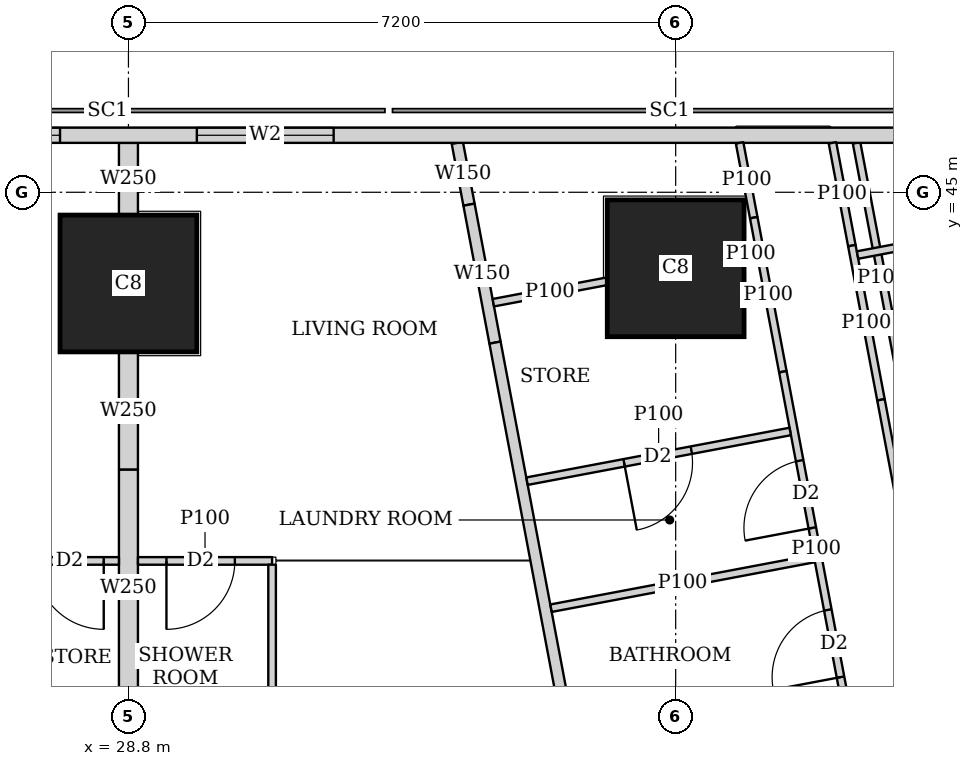
"""IFC4 building model, lengths in metres.
Left out: names, types, materials, properties, quantities, classifications, styles, units other than length and angle.
Written with IfcOpenShell. Run it as: python <this file> out.ifc"""

import sys

from ifc_helpers import new_model, si_unit, direction, frame, frame_2d, origin, origin_2d, place, context, subcontext, project, spatial, rectangle, extrude, element, fill, save


model = new_model("IFC4")
c1 = context("Model", 3, precision=1e-05, world=origin(), true_north=direction((0.0, 1.0)))
c2 = subcontext(c1, "Body", "Model", "MODEL_VIEW")
j1 = project(units=[si_unit("LENGTHUNIT", "METRE"), si_unit("PLANEANGLEUNIT", "RADIAN")], contexts=[c1])
p1 = place(None, origin())
s1 = spatial("IfcSite", under=j1, at=p1, CompositionType="ELEMENT")
p2 = place(p1, origin())
s2 = spatial("IfcBuilding", under=s1, at=p2, CompositionType="ELEMENT")
p3 = place(p2, frame((0.0, 0.0, 180.8)))
s3 = spatial("IfcBuildingStorey", under=s2, at=p3, CompositionType="ELEMENT", Elevation=180.8)
for number, where, z_axis, x_axis in (
    (1, (28.8, 43.8, 0.0), (0.0, 0.0, 1.0), (1.0, 0.0, 0.0)),
    (2, (36.0, 44.0, 0.0), (0.0, 0.0, 1.0), (1.0, 0.0, 0.0)),
):
    element("IfcColumn", number, at=place(p3, frame(where, z_axis=z_axis, x_axis=x_axis)), inside=s3, PredefinedType="COLUMN", context=c2, shape_type="SweptSolid", body=[
        extrude(rectangle(XDim=1.8, YDim=1.8, at=origin_2d()), origin(), (0.0, 0.0, 1.0), 3.75),
    ])
p4 = place(p3, frame((40.106, 45.75, 0.0), z_axis=(0.0, 0.0, 1.0), x_axis=(-1.0, 0.0, 0.0)))
e3 = element("IfcWall", 3, at=p4, inside=s3, PredefinedType="SOLIDWALL", context=c2, shape_type="SweptSolid", body=[
    extrude(rectangle(XDim=37.943, YDim=0.2, at=frame_2d((18.971, 0.0))), origin(), (0.0, 0.0, 1.0), 3.5),
])
p5 = place(p4, frame((8.606, 0.0, 0.9)))
e4 = element("IfcOpeningElement", 4, at=p5, cuts=e3, PredefinedType="OPENING", context=c2, shape_type="SweptSolid", body=[
    extrude(rectangle(XDim=1.8, YDim=1.5, at=frame_2d((0.9, 0.75))), frame((0.0, 0.11, 0.0), z_axis=(0.0, -1.0, 0.0), x_axis=(1.0, 0.0, 0.0)), (0.0, 0.0, 1.0), 0.22),
])
p6 = place(p4, frame((12.206, 0.0, 0.9)))
e5 = element("IfcOpeningElement", 5, at=p6, cuts=e3, PredefinedType="OPENING", context=c2, shape_type="SweptSolid", body=[
    extrude(rectangle(XDim=1.8, YDim=1.5, at=frame_2d((0.9, 0.75))), frame((0.0, 0.11, 0.0), z_axis=(0.0, -1.0, 0.0), x_axis=(1.0, 0.0, 0.0)), (0.0, 0.0, 1.0), 0.22),
])
p7 = place(p4, frame((15.806, 0.0, 0.9)))
e6 = element("IfcOpeningElement", 6, at=p7, cuts=e3, PredefinedType="OPENING", context=c2, shape_type="SweptSolid", body=[
    extrude(rectangle(XDim=1.8, YDim=1.5, at=frame_2d((0.9, 0.75))), frame((0.0, 0.11, 0.0), z_axis=(0.0, -1.0, 0.0), x_axis=(1.0, 0.0, 0.0)), (0.0, 0.0, 1.0), 0.22),
])
p8 = place(p4, frame((19.406, 0.0, 0.9)))
e7 = element("IfcOpeningElement", 7, at=p8, cuts=e3, PredefinedType="OPENING", context=c2, shape_type="SweptSolid", body=[
    extrude(rectangle(XDim=1.8, YDim=1.5, at=frame_2d((0.9, 0.75))), frame((0.0, 0.11, 0.0), z_axis=(0.0, -1.0, 0.0), x_axis=(1.0, 0.0, 0.0)), (0.0, 0.0, 1.0), 0.22),
])
p9 = place(p4, frame((23.006, 0.0, 0.9)))
e8 = element("IfcOpeningElement", 8, at=p9, cuts=e3, PredefinedType="OPENING", context=c2, shape_type="SweptSolid", body=[
    extrude(rectangle(XDim=1.8, YDim=1.5, at=frame_2d((0.9, 0.75))), frame((0.0, 0.11, 0.0), z_axis=(0.0, -1.0, 0.0), x_axis=(1.0, 0.0, 0.0)), (0.0, 0.0, 1.0), 0.22),
])
p10 = place(p4, frame((26.606, 0.0, 0.9)))
e9 = element("IfcOpeningElement", 9, at=p10, cuts=e3, PredefinedType="OPENING", context=c2, shape_type="SweptSolid", body=[
    extrude(rectangle(XDim=1.8, YDim=1.5, at=frame_2d((0.9, 0.75))), frame((0.0, 0.11, 0.0), z_axis=(0.0, -1.0, 0.0), x_axis=(1.0, 0.0, 0.0)), (0.0, 0.0, 1.0), 0.22),
])
p11 = place(p3, frame((33.127, 45.65, 0.0), z_axis=(0.0, 0.0, 1.0), x_axis=(0.186176514576, -0.982516313056, 0.0)))
e10 = element("IfcWall", 10, at=p11, inside=s3, PredefinedType="SOLIDWALL", context=c2, shape_type="SweptSolid", body=[
    extrude(rectangle(XDim=0.827, YDim=0.15, at=frame_2d((0.414, 0.0))), origin(), (0.0, 0.0, 1.0), 3.5),
])
p12 = place(p3, frame((33.281, 44.837, 0.0), z_axis=(0.0, 0.0, 1.0), x_axis=(0.185198323004, -0.982701165745, 0.0)))
e11 = element("IfcWall", 11, at=p12, inside=s3, PredefinedType="SOLIDWALL", context=c2, shape_type="SweptSolid", body=[
    extrude(rectangle(XDim=1.847, YDim=0.15, at=frame_2d((0.923, 0.0))), origin(), (0.0, 0.0, 1.0), 2.1),
])
p13 = place(p3, frame((33.623, 43.022, 0.0), z_axis=(0.0, 0.0, 1.0), x_axis=(0.185596841028, -0.98262597798, 0.0)))
e12 = element("IfcWall", 12, at=p13, inside=s3, PredefinedType="SOLIDWALL", context=c2, shape_type="SweptSolid", body=[
    extrude(rectangle(XDim=41.66, YDim=0.15, at=frame_2d((20.83, 0.0))), origin(), (0.0, 0.0, 1.0), 2.5),
])
p14 = place(p13, frame((8.034, 0.0, 0.0)))
e13 = element("IfcOpeningElement", 13, at=p14, cuts=e12, PredefinedType="OPENING", context=c2, shape_type="SweptSolid", body=[
    extrude(rectangle(XDim=1.0, YDim=2.1, at=frame_2d((0.5, 1.05))), frame((0.0, 0.085, 0.0), z_axis=(0.0, -1.0, 0.0), x_axis=(1.0, 0.0, 0.0)), (0.0, 0.0, 1.0), 0.17),
])
p15 = place(p13, frame((12.611, 0.0, 0.0)))
e14 = element("IfcOpeningElement", 14, at=p15, cuts=e12, PredefinedType="OPENING", context=c2, shape_type="SweptSolid", body=[
    extrude(rectangle(XDim=1.0, YDim=2.1, at=frame_2d((0.5, 1.05))), frame((0.0, 0.085, 0.0), z_axis=(0.0, -1.0, 0.0), x_axis=(1.0, 0.0, 0.0)), (0.0, 0.0, 1.0), 0.17),
])
p16 = place(p13, frame((20.242, 0.0, 0.0)))
e15 = element("IfcOpeningElement", 15, at=p16, cuts=e12, PredefinedType="OPENING", context=c2, shape_type="SweptSolid", body=[
    extrude(rectangle(XDim=1.0, YDim=2.1, at=frame_2d((0.5, 1.05))), frame((0.0, 0.085, 0.0), z_axis=(0.0, -1.0, 0.0), x_axis=(1.0, 0.0, 0.0)), (0.0, 0.0, 1.0), 0.17),
])
p17 = place(p13, frame((31.206, 0.0, 0.0)))
e16 = element("IfcOpeningElement", 16, at=p17, cuts=e12, PredefinedType="OPENING", context=c2, shape_type="SweptSolid", body=[
    extrude(rectangle(XDim=1.0, YDim=2.1, at=frame_2d((0.5, 1.05))), frame((0.0, 0.085, 0.0), z_axis=(0.0, -1.0, 0.0), x_axis=(1.0, 0.0, 0.0)), (0.0, 0.0, 1.0), 0.17),
])
p18 = place(p3, frame((39.054, 42.085, 0.0), z_axis=(0.0, 0.0, 1.0), x_axis=(-0.185791584218, 0.982589175207, 0.0)))
e17 = element("IfcWall", 17, at=p18, inside=s3, PredefinedType="PARTITIONING", context=c2, shape_type="SweptSolid", body=[
    extrude(rectangle(XDim=3.628, YDim=0.1, at=frame_2d((1.814, 0.0))), origin(), (0.0, 0.0, 1.0), 2.1),
])
p19 = place(p3, frame((38.063, 45.65, 0.0), z_axis=(0.0, 0.0, 1.0), x_axis=(0.185456359766, -0.982652501458, 0.0)))
e18 = element("IfcWall", 18, at=p19, inside=s3, PredefinedType="PARTITIONING", context=c2, shape_type="SweptSolid", body=[
    extrude(rectangle(XDim=1.376, YDim=0.1, at=frame_2d((0.688, 0.0))), origin(), (0.0, 0.0, 1.0), 3.5),
])
p20 = place(p3, frame((38.318, 44.298, 0.0), z_axis=(0.0, 0.0, 1.0), x_axis=(0.185481135188, -0.982647825261, 0.0)))
e19 = element("IfcWall", 19, at=p20, inside=s3, PredefinedType="PARTITIONING", context=c2, shape_type="SweptSolid", body=[
    extrude(rectangle(XDim=2.064, YDim=0.1, at=frame_2d((1.032, 0.0))), origin(), (0.0, 0.0, 1.0), 2.1),
])
p21 = place(p3, frame((38.701, 42.27, 0.0), z_axis=(0.0, 0.0, 1.0), x_axis=(0.185474244877, -0.982649125826, 0.0)))
e20 = element("IfcWall", 20, at=p21, inside=s3, PredefinedType="PARTITIONING", context=c2, shape_type="SweptSolid", body=[
    extrude(rectangle(XDim=5.494, YDim=0.1, at=frame_2d((2.747, 0.0))), origin(), (0.0, 0.0, 1.0), 3.5),
])
p22 = place(p21, frame((3.085, 0.0, 0.0)))
e21 = element("IfcOpeningElement", 21, at=p22, cuts=e20, PredefinedType="OPENING", context=c2, shape_type="SweptSolid", body=[
    extrude(rectangle(XDim=0.9, YDim=2.1, at=frame_2d((0.45, 1.05))), frame((0.0, 0.06, 0.0), z_axis=(0.0, -1.0, 0.0), x_axis=(1.0, 0.0, 0.0)), (0.0, 0.0, 1.0), 0.12),
])
p23 = place(p3, frame((36.841, 45.65, 0.0), z_axis=(0.0, 0.0, 1.0), x_axis=(0.185789875365, -0.982589498322, 0.0)))
e22 = element("IfcWall", 22, at=p23, inside=s3, PredefinedType="PARTITIONING", context=c2, shape_type="SweptSolid", body=[
    extrude(rectangle(XDim=1.001, YDim=0.1, at=frame_2d((0.5, 0.0))), origin(), (0.0, 0.0, 1.0), 3.5),
])
p24 = place(p3, frame((37.027, 44.666, 0.0), z_axis=(0.0, 0.0, 1.0), x_axis=(0.1855674151, -0.982631535446, 0.0)))
e23 = element("IfcWall", 23, at=p24, inside=s3, PredefinedType="PARTITIONING", context=c2, shape_type="SweptSolid", body=[
    extrude(rectangle(XDim=2.063, YDim=0.1, at=frame_2d((1.031, 0.0))), origin(), (0.0, 0.0, 1.0), 2.1),
])
p25 = place(p3, frame((37.41, 42.639, 0.0), z_axis=(0.0, 0.0, 1.0), x_axis=(0.185579683022, -0.982629218601, 0.0)))
e24 = element("IfcWall", 24, at=p25, inside=s3, PredefinedType="PARTITIONING", context=c2, shape_type="SweptSolid", body=[
    extrude(rectangle(XDim=4.737, YDim=0.1, at=frame_2d((2.369, 0.0))), origin(), (0.0, 0.0, 1.0), 3.5),
])
p26 = place(p25, frame((3.189, 0.0, 0.0)))
e25 = element("IfcOpeningElement", 25, at=p26, cuts=e24, PredefinedType="OPENING", context=c2, shape_type="SweptSolid", body=[
    extrude(rectangle(XDim=0.9, YDim=2.1, at=frame_2d((0.45, 1.05))), frame((0.0, 0.06, 0.0), z_axis=(0.0, -1.0, 0.0), x_axis=(1.0, 0.0, 0.0)), (0.0, 0.0, 1.0), 0.12),
])
p27 = place(p25, frame((1.191, 0.0, 0.0)))
e26 = element("IfcOpeningElement", 26, at=p27, cuts=e24, PredefinedType="OPENING", context=c2, shape_type="SweptSolid", body=[
    extrude(rectangle(XDim=0.9, YDim=2.1, at=frame_2d((0.45, 1.05))), frame((0.0, 0.06, 0.0), z_axis=(0.0, -1.0, 0.0), x_axis=(1.0, 0.0, 0.0)), (0.0, 0.0, 1.0), 0.12),
])
p28 = place(p3, frame((41.968, 44.85, 0.0), z_axis=(0.0, 0.0, 1.0), x_axis=(-0.98258614234, -0.185807623311, 0.0)))
e27 = element("IfcWall", 27, at=p28, inside=s3, PredefinedType="PARTITIONING", context=c2, shape_type="SweptSolid", body=[
    extrude(rectangle(XDim=3.638, YDim=0.1, at=frame_2d((1.819, 0.0))), origin(), (0.0, 0.0, 1.0), 2.1),
])
p29 = place(p3, frame((37.064, 44.201, 0.0), z_axis=(0.0, 0.0, 1.0), x_axis=(-0.982960250751, -0.183818240236, 0.0)))
e28 = element("IfcWall", 28, at=p29, inside=s3, PredefinedType="PARTITIONING", context=c2, shape_type="SweptSolid", body=[
    extrude(rectangle(XDim=0.157, YDim=0.1, at=frame_2d((0.078, 0.0))), origin(), (0.0, 0.0, 1.0), 2.1),
])
p30 = place(p3, frame((35.09, 43.828, 0.0), z_axis=(0.0, 0.0, 1.0), x_axis=(-0.982683801717, -0.185290436461, 0.0)))
e29 = element("IfcWall", 29, at=p30, inside=s3, PredefinedType="PARTITIONING", context=c2, shape_type="SweptSolid", body=[
    extrude(rectangle(XDim=1.515, YDim=0.1, at=frame_2d((0.758, 0.0))), origin(), (0.0, 0.0, 1.0), 2.1),
])
p31 = place(p3, frame((37.823, 40.182, 0.0), z_axis=(0.0, 0.0, 1.0), x_axis=(-0.98263926043, -0.185526504472, 0.0)))
e30 = element("IfcWall", 30, at=p31, inside=s3, PredefinedType="PARTITIONING", context=c2, shape_type="SweptSolid", body=[
    extrude(rectangle(XDim=3.524, YDim=0.1, at=frame_2d((1.762, 0.0))), origin(), (0.0, 0.0, 1.0), 3.5),
])
p32 = place(p3, frame((37.507, 41.853, 0.0), z_axis=(0.0, 0.0, 1.0), x_axis=(-0.982629014545, -0.18558076348, 0.0)))
e31 = element("IfcWall", 31, at=p32, inside=s3, PredefinedType="PARTITIONING", context=c2, shape_type="SweptSolid", body=[
    extrude(rectangle(XDim=3.524, YDim=0.1, at=frame_2d((1.762, 0.0))), origin(), (0.0, 0.0, 1.0), 3.5),
])
p33 = place(p32, frame((1.324, 0.0, 0.0)))
e32 = element("IfcOpeningElement", 32, at=p33, cuts=e31, PredefinedType="OPENING", context=c2, shape_type="SweptSolid", body=[
    extrude(rectangle(XDim=0.9, YDim=2.1, at=frame_2d((0.45, 1.05))), frame((0.0, 0.06, 0.0), z_axis=(0.0, -1.0, 0.0), x_axis=(1.0, 0.0, 0.0)), (0.0, 0.0, 1.0), 0.12),
])
p34 = place(p3, frame((25.2, 40.15, 0.0), z_axis=(0.0, 0.0, 1.0), x_axis=(1.0, 0.0, 0.0)))
e33 = element("IfcWall", 33, at=p34, inside=s3, PredefinedType="PARTITIONING", context=c2, shape_type="SweptSolid", body=[
    extrude(rectangle(XDim=3.475, YDim=0.1, at=frame_2d((1.738, 0.0))), origin(), (0.0, 0.0, 1.0), 3.5),
])
p35 = place(p34, frame((0.575, 0.0, 0.0)))
e34 = element("IfcOpeningElement", 34, at=p35, cuts=e33, PredefinedType="OPENING", context=c2, shape_type="SweptSolid", body=[
    extrude(rectangle(XDim=0.9, YDim=2.1, at=frame_2d((0.45, 1.05))), frame((0.0, 0.06, 0.0), z_axis=(0.0, -1.0, 0.0), x_axis=(1.0, 0.0, 0.0)), (0.0, 0.0, 1.0), 0.12),
])
p36 = place(p34, frame((2.375, 0.0, 0.0)))
e35 = element("IfcOpeningElement", 35, at=p36, cuts=e33, PredefinedType="OPENING", context=c2, shape_type="SweptSolid", body=[
    extrude(rectangle(XDim=0.9, YDim=2.1, at=frame_2d((0.45, 1.05))), frame((0.0, 0.06, 0.0), z_axis=(0.0, -1.0, 0.0), x_axis=(1.0, 0.0, 0.0)), (0.0, 0.0, 1.0), 0.12),
])
p37 = place(p3, frame((28.925, 40.15, 0.0), z_axis=(0.0, 0.0, 1.0), x_axis=(1.0, 0.0, 0.0)))
e36 = element("IfcWall", 36, at=p37, inside=s3, PredefinedType="PARTITIONING", context=c2, shape_type="SweptSolid", body=[
    extrude(rectangle(XDim=1.765, YDim=0.1, at=frame_2d((0.882, 0.0))), origin(), (0.0, 0.0, 1.0), 3.5),
])
p38 = place(p37, frame((0.375, 0.0, 0.0)))
e37 = element("IfcOpeningElement", 37, at=p38, cuts=e36, PredefinedType="OPENING", context=c2, shape_type="SweptSolid", body=[
    extrude(rectangle(XDim=0.9, YDim=2.1, at=frame_2d((0.45, 1.05))), frame((0.0, 0.06, 0.0), z_axis=(0.0, -1.0, 0.0), x_axis=(1.0, 0.0, 0.0)), (0.0, 0.0, 1.0), 0.12),
])
p39 = place(p3, frame((30.69, 36.575, 0.0), z_axis=(0.0, 0.0, 1.0), x_axis=(0.0, 1.0, 0.0)))
e38 = element("IfcWall", 38, at=p39, inside=s3, PredefinedType="PARTITIONING", context=c2, shape_type="SweptSolid", body=[
    extrude(rectangle(XDim=3.525, YDim=0.1, at=frame_2d((1.763, 0.0))), origin(), (0.0, 0.0, 1.0), 3.5),
])
p40 = place(p3, frame((28.8, 41.35, 0.0), z_axis=(0.0, 0.0, 1.0), x_axis=(0.0, 1.0, 0.0)))
e39 = element("IfcWall", 39, at=p40, inside=s3, PredefinedType="SOLIDWALL", context=c2, shape_type="SweptSolid", body=[
    extrude(rectangle(XDim=1.549, YDim=0.25, at=frame_2d((0.774, 0.0))), origin(), (0.0, 0.0, 1.0), 2.1),
])
p41 = place(p3, frame((28.8, 44.701, 0.0), z_axis=(0.0, 0.0, 1.0), x_axis=(0.0, 1.0, 0.0)))
e40 = element("IfcWall", 40, at=p41, inside=s3, PredefinedType="SOLIDWALL", context=c2, shape_type="SweptSolid", body=[
    extrude(rectangle(XDim=0.949, YDim=0.25, at=frame_2d((0.475, 0.0))), origin(), (0.0, 0.0, 1.0), 2.1),
])
p42 = place(p3, frame((28.8, 38.251, 0.0), z_axis=(0.0, 0.0, 1.0), x_axis=(0.0, 1.0, 0.0)))
e41 = element("IfcWall", 41, at=p42, inside=s3, PredefinedType="SOLIDWALL", context=c2, shape_type="SweptSolid", body=[
    extrude(rectangle(XDim=3.099, YDim=0.25, at=frame_2d((1.55, 0.0))), origin(), (0.0, 0.0, 1.0), 3.5),
])
p43 = place(p5, origin())
e42 = element("IfcWindow", 42, at=p43, inside=s3, PartitioningType="SINGLE_PANEL", PredefinedType="WINDOW", context=c2, shape_type="SweptSolid", body=[
    extrude(rectangle(XDim=1.8, YDim=1.5, at=frame_2d((0.9, 0.75))), frame((0.0, 0.03, 0.0), z_axis=(0.0, -1.0, 0.0), x_axis=(1.0, 0.0, 0.0)), (0.0, 0.0, 1.0), 0.06),
])
fill(e4, e42)
p44 = place(p6, origin())
e43 = element("IfcWindow", 43, at=p44, inside=s3, PartitioningType="SINGLE_PANEL", PredefinedType="WINDOW", context=c2, shape_type="SweptSolid", body=[
    extrude(rectangle(XDim=1.8, YDim=1.5, at=frame_2d((0.9, 0.75))), frame((0.0, 0.03, 0.0), z_axis=(0.0, -1.0, 0.0), x_axis=(1.0, 0.0, 0.0)), (0.0, 0.0, 1.0), 0.06),
])
fill(e5, e43)
p45 = place(p26, origin())
e44 = element("IfcDoor", 44, at=p45, inside=s3, OperationType="SINGLE_SWING_LEFT", PredefinedType="DOOR", context=c2, shape_type="SweptSolid", body=[
    extrude(rectangle(XDim=0.9, YDim=2.1, at=frame_2d((0.45, 1.05))), frame((0.0, 0.025, 0.0), z_axis=(0.0, -1.0, 0.0), x_axis=(1.0, 0.0, 0.0)), (0.0, 0.0, 1.0), 0.05),
])
fill(e25, e44)
p46 = place(p27, origin())
e45 = element("IfcDoor", 45, at=p46, inside=s3, OperationType="SINGLE_SWING_LEFT", PredefinedType="DOOR", context=c2, shape_type="SweptSolid", body=[
    extrude(rectangle(XDim=0.9, YDim=2.1, at=frame_2d((0.45, 1.05))), frame((0.0, 0.025, 0.0), z_axis=(0.0, -1.0, 0.0), x_axis=(1.0, 0.0, 0.0)), (0.0, 0.0, 1.0), 0.05),
])
fill(e26, e45)
p47 = place(p33, origin())
e46 = element("IfcDoor", 46, at=p47, inside=s3, OperationType="SINGLE_SWING_RIGHT", PredefinedType="DOOR", context=c2, shape_type="SweptSolid", body=[
    extrude(rectangle(XDim=0.9, YDim=2.1, at=frame_2d((0.45, 1.05))), frame((0.0, 0.025, 0.0), z_axis=(0.0, -1.0, 0.0), x_axis=(1.0, 0.0, 0.0)), (0.0, 0.0, 1.0), 0.05),
])
fill(e32, e46)
p48 = place(p36, origin())
e47 = element("IfcDoor", 47, at=p48, inside=s3, OperationType="SINGLE_SWING_LEFT", PredefinedType="DOOR", context=c2, shape_type="SweptSolid", body=[
    extrude(rectangle(XDim=0.9, YDim=2.1, at=frame_2d((0.45, 1.05))), frame((0.0, 0.025, 0.0), z_axis=(0.0, -1.0, 0.0), x_axis=(1.0, 0.0, 0.0)), (0.0, 0.0, 1.0), 0.05),
])
fill(e35, e47)
p49 = place(p38, origin())
e48 = element("IfcDoor", 48, at=p49, inside=s3, OperationType="SINGLE_SWING_RIGHT", PredefinedType="DOOR", context=c2, shape_type="SweptSolid", body=[
    extrude(rectangle(XDim=0.9, YDim=2.1, at=frame_2d((0.45, 1.05))), frame((0.0, 0.025, 0.0), z_axis=(0.0, -1.0, 0.0), x_axis=(1.0, 0.0, 0.0)), (0.0, 0.0, 1.0), 0.05),
])
fill(e37, e48)
save(model, sys.argv[1])
